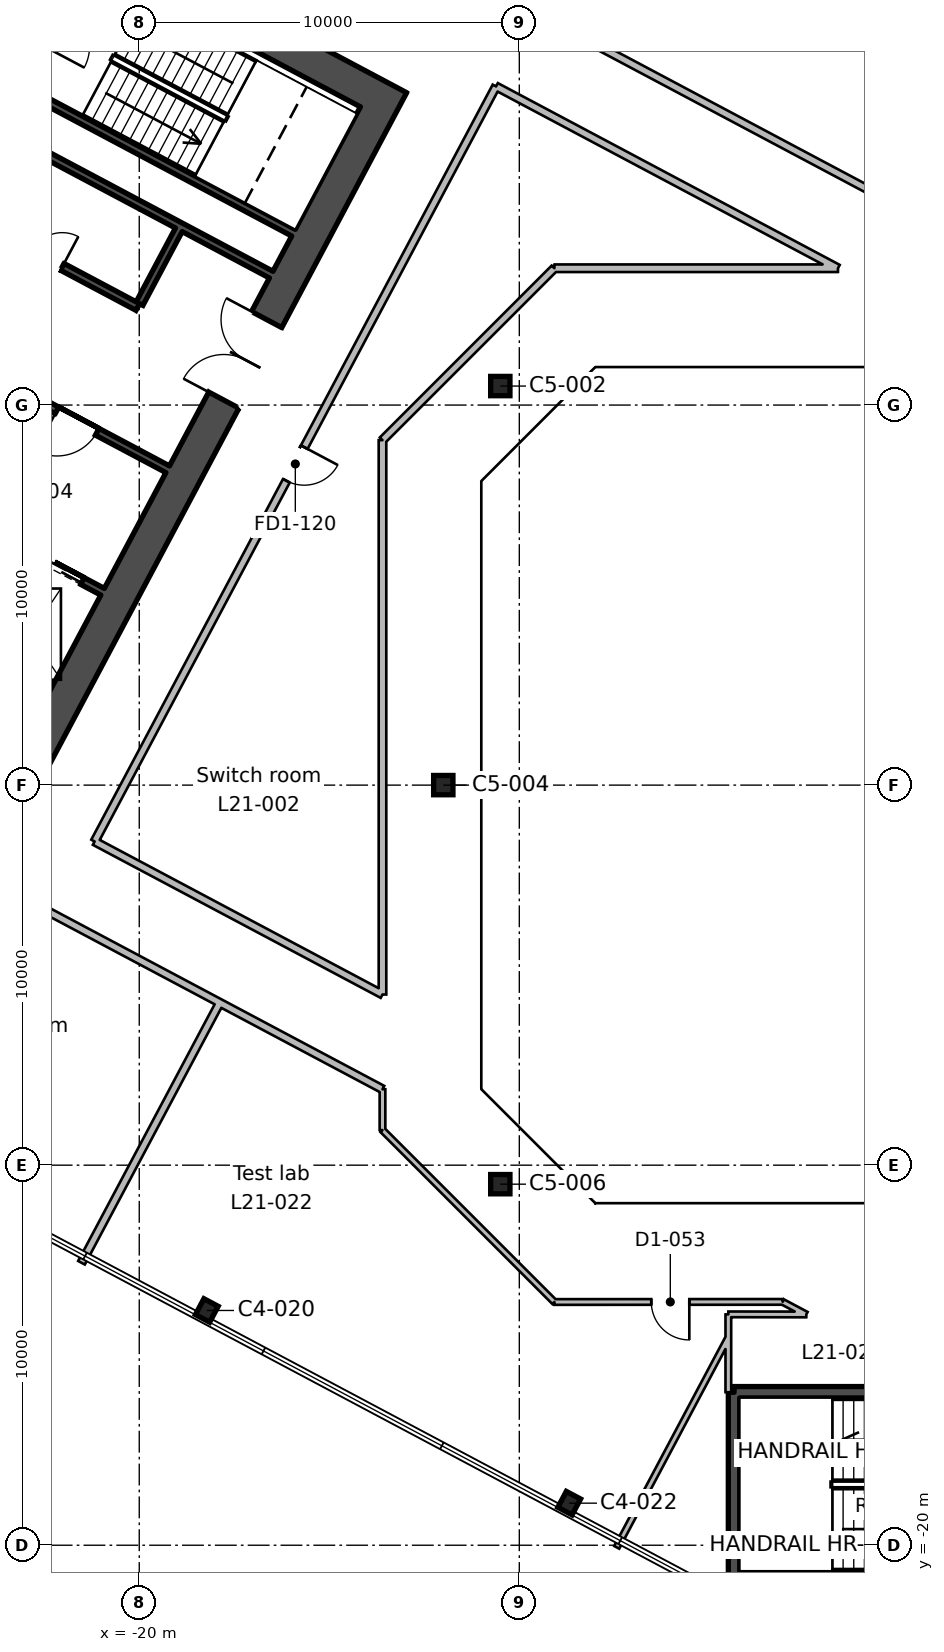
"""IFC4 building model, lengths in metres.
Left out: names, types, materials, properties, quantities, classifications, styles, units other than length and angle.
Written with IfcOpenShell. Run it as: python <this file> out.ifc"""

import sys

from ifc_helpers import new_model, si_unit, direction, frame, frame_2d, origin, origin_2d, place, context, subcontext, project, spatial, rectangle, hollow_rectangle, i_section, extrude, element, fill, save


model = new_model("IFC4")
c1 = context("Model", 3, precision=1e-05, world=origin(), true_north=direction((0.0, 1.0)))
c2 = subcontext(c1, "Body", "Model", "MODEL_VIEW")
j1 = project(units=[si_unit("LENGTHUNIT", "METRE"), si_unit("PLANEANGLEUNIT", "RADIAN")], contexts=[c1])
p1 = place(None, origin())
s1 = spatial("IfcSite", under=j1, at=p1, CompositionType="ELEMENT")
p2 = place(p1, origin())
s2 = spatial("IfcBuilding", under=s1, at=p2, CompositionType="ELEMENT")
p3 = place(p2, frame((0.0, 0.0, 107.6)))
s3 = spatial("IfcBuildingStorey", under=s2, at=p3, CompositionType="ELEMENT", Elevation=107.6)
for number, where, z_axis, x_axis in (
    (1, (-8.687, -18.893, 0.0), (0.0, 0.0, 1.0), (0.883, -0.469, 0.0)),
    (2, (-18.223, -13.823, 0.0), (0.0, 0.0, 1.0), (0.883, -0.469, 0.0)),
):
    element("IfcColumn", number, at=place(p3, frame(where, z_axis=z_axis, x_axis=x_axis)), inside=s3, PredefinedType="COLUMN", context=c2, shape_type="SweptSolid", body=[
        extrude(i_section(OverallWidth=0.424, OverallDepth=0.475, WebThickness=0.048, FlangeThickness=0.077, FilletRadius=0.015, at=origin_2d()), origin(), (0.0, 0.0, 1.0), 4.6),
    ])
for number, where, z_axis, x_axis in (
    (3, (-10.5, -10.5, 0.0), (0.0, 0.0, 1.0), (1.0, 0.0, 0.0)),
    (4, (-12.0, 0.0, 0.0), (0.0, 0.0, 1.0), (1.0, 0.0, 0.0)),
    (5, (-10.5, 10.5, 0.0), (0.0, 0.0, 1.0), (1.0, 0.0, 0.0)),
):
    element("IfcColumn", number, at=place(p3, frame(where, z_axis=z_axis, x_axis=x_axis)), inside=s3, PredefinedType="COLUMN", context=c2, shape_type="SweptSolid", body=[
        extrude(hollow_rectangle(XDim=0.508, YDim=0.508, WallThickness=0.021, InnerFilletRadius=0.01, OuterFilletRadius=0.031, at=origin_2d()), origin(), (0.0, 0.0, 1.0), 4.6),
    ])
p4 = place(p3, frame((-13.362, 18.43, 0.0), z_axis=(0.0, 0.0, 1.0), x_axis=(-0.46947084998, -0.882947971864, 0.0)))
e6 = element("IfcWall", 6, at=p4, inside=s3, PredefinedType="SHEAR", context=c2, shape_type="SweptSolid", body=[
    extrude(rectangle(XDim=20.0, YDim=0.9, at=frame_2d((10.0, 0.0))), origin(), (0.0, 0.0, 1.0), 4.6),
])
p5 = place(p4, frame((7.0, 0.0, 0.0)))
e7 = element("IfcOpeningElement", 7, at=p5, cuts=e6, PredefinedType="OPENING", context=c2, shape_type="SweptSolid", body=[
    extrude(rectangle(XDim=2.4, YDim=2.4, at=frame_2d((1.2, 1.2))), frame((0.0, 0.46, 0.0), z_axis=(0.0, -1.0, 0.0), x_axis=(1.0, 0.0, 0.0)), (0.0, 0.0, 1.0), 0.92),
])
p6 = place(p3, frame((-13.97, 18.244, 0.0), z_axis=(0.0, 0.0, 1.0), x_axis=(-0.88294509198, 0.469476266226, 0.0)))
e8 = element("IfcWall", 8, at=p6, inside=s3, PredefinedType="SHEAR", context=c2, shape_type="SweptSolid", body=[
    extrude(rectangle(XDim=20.2, YDim=0.9, at=frame_2d((10.1, 0.0))), origin(), (0.0, 0.0, 1.0), 4.6),
])
p7 = place(p3, frame((-18.96, 14.611, 0.0), z_axis=(0.0, 0.0, 1.0), x_axis=(-0.4694473164, -0.882960484464, 0.0)))
e9 = element("IfcWall", 9, at=p7, inside=s3, PredefinedType="SHEAR", context=c2, shape_type="SweptSolid", body=[
    extrude(rectangle(XDim=2.2, YDim=0.2, at=frame_2d((1.1, 0.0))), origin(), (0.0, 0.0, 1.0), 4.6),
])
p8 = place(p3, frame((-21.333, 21.649, 0.0), z_axis=(0.0, 0.0, 1.0), x_axis=(-0.469494272526, -0.882935517501, 0.0)))
e10 = element("IfcWall", 10, at=p8, inside=s3, PredefinedType="SHEAR", context=c2, shape_type="SweptSolid", body=[
    extrude(rectangle(XDim=7.3, YDim=0.2, at=frame_2d((3.65, 0.0))), origin(), (0.0, 0.0, 1.0), 4.6),
])
p9 = place(p8, frame((1.3, 0.0, 0.0)))
e11 = element("IfcOpeningElement", 11, at=p9, cuts=e10, PredefinedType="OPENING", context=c2, shape_type="SweptSolid", body=[
    extrude(rectangle(XDim=1.2, YDim=2.1, at=frame_2d((0.6, 1.05))), frame((0.0, 0.11, 0.0), z_axis=(0.0, -1.0, 0.0), x_axis=(1.0, 0.0, 0.0)), (0.0, 0.0, 1.0), 0.22),
])
p10 = place(p3, frame((-15.942, 14.536, 0.0), z_axis=(0.0, 0.0, 1.0), x_axis=(-0.882946947542, 0.469472776449, 0.0)))
e12 = element("IfcWall", 12, at=p10, inside=s3, PredefinedType="SHEAR", context=c2, shape_type="SweptSolid", body=[
    extrude(rectangle(XDim=8.0, YDim=0.2, at=frame_2d((4.0, 0.0))), origin(), (0.0, 0.0, 1.0), 4.6),
])
p11 = place(p3, frame((-16.529, 13.432, 0.0), z_axis=(0.0, 0.0, 1.0), x_axis=(-0.88295287151, 0.469461634952, 0.0)))
e13 = element("IfcWall", 13, at=p11, inside=s3, PredefinedType="SHEAR", context=c2, shape_type="SweptSolid", body=[
    extrude(rectangle(XDim=8.0, YDim=0.2, at=frame_2d((4.0, 0.0))), origin(), (0.0, 0.0, 1.0), 4.6),
])
p12 = place(p3, frame((-20.04, 12.581, 0.0), z_axis=(0.0, 0.0, 1.0), x_axis=(-0.882942972946, 0.469480251476, 0.0)))
e14 = element("IfcWall", 14, at=p12, inside=s3, PredefinedType="SHEAR", context=c2, shape_type="SweptSolid", body=[
    extrude(rectangle(XDim=5.4, YDim=0.2, at=frame_2d((2.7, 0.0))), origin(), (0.0, 0.0, 1.0), 4.6),
])
p13 = place(p12, frame((2.25, 0.0, 0.0)))
e15 = element("IfcOpeningElement", 15, at=p13, cuts=e14, PredefinedType="OPENING", context=c2, shape_type="SweptSolid", body=[
    extrude(rectangle(XDim=0.9, YDim=2.1, at=frame_2d((0.45, 1.05))), frame((0.0, 0.11, 0.0), z_axis=(0.0, -1.0, 0.0), x_axis=(1.0, 0.0, 0.0)), (0.0, 0.0, 1.0), 0.22),
])
p14 = place(p3, frame((-19.252, 8.311, 0.0), z_axis=(0.0, 0.0, 1.0), x_axis=(-0.882955722218, 0.469456273365, 0.0)))
e16 = element("IfcWall", 16, at=p14, inside=s3, PredefinedType="SHEAR", context=c2, shape_type="SweptSolid", body=[
    extrude(rectangle(XDim=10.0, YDim=0.2, at=frame_2d((5.0, 0.0))), origin(), (0.0, 0.0, 1.0), 4.6),
])
p15 = place(p14, frame((2.1, 0.0, 0.0)))
e17 = element("IfcOpeningElement", 17, at=p15, cuts=e16, PredefinedType="OPENING", context=c2, shape_type="SweptSolid", body=[
    extrude(rectangle(XDim=1.2, YDim=2.1, at=frame_2d((0.6, 1.05))), frame((0.0, 0.11, 0.0), z_axis=(0.0, -1.0, 0.0), x_axis=(1.0, 0.0, 0.0)), (0.0, 0.0, 1.0), 0.22),
])
p16 = place(p3, frame((-20.965, 5.088, 0.0), z_axis=(0.0, 0.0, 1.0), x_axis=(-0.882925986334, 0.469512196493, 0.0)))
e18 = element("IfcWall", 18, at=p16, inside=s3, PredefinedType="SHEAR", context=c2, shape_type="SweptSolid", body=[
    extrude(rectangle(XDim=4.5, YDim=0.2, at=frame_2d((2.25, 0.0))), origin(), (0.0, 0.0, 1.0), 4.6),
])
p17 = place(p16, frame((0.6, 0.0, 0.0)))
e19 = element("IfcOpeningElement", 19, at=p17, cuts=e18, PredefinedType="OPENING", context=c2, shape_type="SweptSolid", body=[
    extrude(rectangle(XDim=1.1, YDim=2.1, at=frame_2d((0.55, 1.05))), frame((0.0, 0.11, 0.0), z_axis=(0.0, -1.0, 0.0), x_axis=(1.0, 0.0, 0.0)), (0.0, 0.0, 1.0), 0.22),
])
p18 = place(p3, frame((3.95, -20.825, 0.0), z_axis=(0.0, 0.0, 1.0), x_axis=(-1.0, 0.0, 0.0)))
e20 = element("IfcWall", 20, at=p18, inside=s3, PredefinedType="SHEAR", context=c2, shape_type="SweptSolid", body=[
    extrude(rectangle(XDim=8.3, YDim=0.3, at=frame_2d((4.15, 0.0))), origin(), (0.0, 0.0, 1.0), 4.6),
])
p19 = place(p3, frame((-4.35, -20.825, 0.0), z_axis=(0.0, 0.0, 1.0), x_axis=(0.0, 1.0, 0.0)))
e21 = element("IfcWall", 21, at=p19, inside=s3, PredefinedType="SHEAR", context=c2, shape_type="SweptSolid", body=[
    extrude(rectangle(XDim=4.85, YDim=0.3, at=frame_2d((2.425, 0.0))), origin(), (0.0, 0.0, 1.0), 4.6),
])
p20 = place(p3, frame((-4.35, -15.975, 0.0), z_axis=(0.0, 0.0, 1.0), x_axis=(1.0, 0.0, 0.0)))
e22 = element("IfcWall", 22, at=p20, inside=s3, PredefinedType="SHEAR", context=c2, shape_type="SweptSolid", body=[
    extrude(rectangle(XDim=8.3, YDim=0.3, at=frame_2d((4.15, 0.0))), origin(), (0.0, 0.0, 1.0), 4.6),
])
p21 = place(p20, frame((6.05, 0.0, 0.0)))
e23 = element("IfcOpeningElement", 23, at=p21, cuts=e22, PredefinedType="OPENING", context=c2, shape_type="SweptSolid", body=[
    extrude(rectangle(XDim=1.9, YDim=2.1, at=frame_2d((0.95, 1.05))), frame((0.0, 0.16, 0.0), z_axis=(0.0, -1.0, 0.0), x_axis=(1.0, 0.0, 0.0)), (0.0, 0.0, 1.0), 0.32),
])
p22 = place(p3, frame((-13.6, -9.077, 0.0), z_axis=(0.0, 0.0, 1.0), x_axis=(0.0, 1.0, 0.0)))
e24 = element("IfcWall", 24, at=p22, inside=s3, PredefinedType="PARTITIONING", context=c2, shape_type="SweptSolid", body=[
    extrude(rectangle(XDim=1.075, YDim=0.15, at=frame_2d((0.538, 0.0))), origin(), (0.0, 0.0, 1.0), 4.15),
])
p23 = place(p3, frame((-13.6, -8.002, 0.0), z_axis=(0.0, 0.0, 1.0), x_axis=(-0.882949686262, 0.469467625646, 0.0)))
e25 = element("IfcWall", 25, at=p23, inside=s3, PredefinedType="PARTITIONING", context=c2, shape_type="SweptSolid", body=[
    extrude(rectangle(XDim=34.795, YDim=0.2, at=frame_2d((17.397, 0.0))), origin(), (0.0, 0.0, 1.0), 4.15),
])
p24 = place(p23, frame((26.25, 0.0, 0.0)))
e26 = element("IfcOpeningElement", 26, at=p24, cuts=e25, PredefinedType="OPENING", context=c2, shape_type="SweptSolid", body=[
    extrude(rectangle(XDim=1.0, YDim=2.1, at=frame_2d((0.5, 1.05))), frame((0.0, 0.11, 0.0), z_axis=(0.0, -1.0, 0.0), x_axis=(1.0, 0.0, 0.0)), (0.0, 0.0, 1.0), 0.22),
])
p25 = place(p23, frame((16.85, 0.0, 0.0)))
e27 = element("IfcOpeningElement", 27, at=p25, cuts=e25, PredefinedType="OPENING", context=c2, shape_type="SweptSolid", body=[
    extrude(rectangle(XDim=1.0, YDim=2.1, at=frame_2d((0.5, 1.05))), frame((0.0, 0.11, 0.0), z_axis=(0.0, -1.0, 0.0), x_axis=(1.0, 0.0, 0.0)), (0.0, 0.0, 1.0), 0.22),
])
p26 = place(p3, frame((-17.881, -5.725, 0.0), z_axis=(0.0, 0.0, 1.0), x_axis=(-0.469513711464, -0.882925180719, 0.0)))
e28 = element("IfcWall", 28, at=p26, inside=s3, PredefinedType="PARTITIONING", context=c2, shape_type="SweptSolid", body=[
    extrude(rectangle(XDim=7.75, YDim=0.2, at=frame_2d((3.875, 0.0))), origin(), (0.0, 0.0, 1.0), 4.15),
])
p27 = place(p3, frame((-32.541, 32.535, 0.0), z_axis=(0.0, 0.0, 1.0), x_axis=(0.882951675281, -0.469463884787, 0.0)))
e29 = element("IfcWall", 29, at=p27, inside=s3, PredefinedType="PARTITIONING", context=c2, shape_type="SweptSolid", body=[
    extrude(rectangle(XDim=36.855, YDim=0.2, at=frame_2d((18.427, 0.0))), origin(), (0.0, 0.0, 1.0), 4.15),
])
p28 = place(p27, frame((17.95, 0.0, 0.0)))
e30 = element("IfcOpeningElement", 30, at=p28, cuts=e29, PredefinedType="OPENING", context=c2, shape_type="SweptSolid", body=[
    extrude(rectangle(XDim=1.0, YDim=2.1, at=frame_2d((0.5, 1.05))), frame((0.0, 0.11, 0.0), z_axis=(0.0, -1.0, 0.0), x_axis=(1.0, 0.0, 0.0)), (0.0, 0.0, 1.0), 0.22),
])
p29 = place(p27, frame((14.75, 0.0, 0.0)))
e31 = element("IfcOpeningElement", 31, at=p29, cuts=e29, PredefinedType="OPENING", context=c2, shape_type="SweptSolid", body=[
    extrude(rectangle(XDim=1.0, YDim=2.1, at=frame_2d((0.5, 1.05))), frame((0.0, 0.11, 0.0), z_axis=(0.0, -1.0, 0.0), x_axis=(1.0, 0.0, 0.0)), (0.0, 0.0, 1.0), 0.22),
])
p30 = place(p3, frame((-13.6, -9.077, 0.0), z_axis=(0.0, 0.0, 1.0), x_axis=(0.707106781187, -0.707106781187, 0.0)))
e32 = element("IfcWall", 32, at=p30, inside=s3, PredefinedType="PARTITIONING", context=c2, shape_type="SweptSolid", body=[
    extrude(rectangle(XDim=6.397, YDim=0.15, at=frame_2d((3.198, 0.0))), origin(), (0.0, 0.0, 1.0), 4.15),
])
p31 = place(p3, frame((-9.077, -13.6, 0.0), z_axis=(0.0, 0.0, 1.0), x_axis=(0.999999860368, 0.000528455211, 0.0)))
e33 = element("IfcWall", 33, at=p31, inside=s3, PredefinedType="PARTITIONING", context=c2, shape_type="SweptSolid", body=[
    extrude(rectangle(XDim=6.006, YDim=0.15, at=frame_2d((3.003, 0.0))), origin(), (0.0, 0.0, 1.0), 4.15),
])
p32 = place(p31, frame((2.55, 0.0, 0.0)))
e34 = element("IfcOpeningElement", 34, at=p32, cuts=e33, PredefinedType="OPENING", context=c2, shape_type="SweptSolid", body=[
    extrude(rectangle(XDim=1.0, YDim=2.1, at=frame_2d((0.5, 1.05))), frame((0.0, 0.085, 0.0), z_axis=(0.0, -1.0, 0.0), x_axis=(1.0, 0.0, 0.0)), (0.0, 0.0, 1.0), 0.17),
])
p33 = place(p3, frame((-3.071, -13.597, 0.0), z_axis=(0.0, 0.0, 1.0), x_axis=(0.883079874776, -0.469222692083, 0.0)))
e35 = element("IfcWall", 35, at=p33, inside=s3, PredefinedType="PARTITIONING", context=c2, shape_type="SweptSolid", body=[
    extrude(rectangle(XDim=0.706, YDim=0.15, at=frame_2d((0.353, 0.0))), origin(), (0.0, 0.0, 1.0), 4.15),
])
p34 = place(p3, frame((-2.448, -13.928, 0.0), z_axis=(0.0, 0.0, 1.0), x_axis=(-0.999998980807, 0.001427720139, 0.0)))
e36 = element("IfcWall", 36, at=p34, inside=s3, PredefinedType="PARTITIONING", context=c2, shape_type="SweptSolid", body=[
    extrude(rectangle(XDim=2.052, YDim=0.15, at=frame_2d((1.026, 0.0))), origin(), (0.0, 0.0, 1.0), 4.15),
])
p35 = place(p3, frame((-4.5, -13.925, 0.0), z_axis=(0.0, 0.0, 1.0), x_axis=(0.0, -1.0, 0.0)))
e37 = element("IfcWall", 37, at=p35, inside=s3, PredefinedType="PARTITIONING", context=c2, shape_type="SweptSolid", body=[
    extrude(rectangle(XDim=2.05, YDim=0.15, at=frame_2d((1.025, 0.0))), origin(), (0.0, 0.0, 1.0), 4.15),
])
p36 = place(p3, frame((-4.5, -14.533, 0.0), z_axis=(0.0, 0.0, 1.0), x_axis=(-0.469522352041, -0.882920585859, 0.0)))
e38 = element("IfcWall", 38, at=p36, inside=s3, PredefinedType="PARTITIONING", context=c2, shape_type="SweptSolid", body=[
    extrude(rectangle(XDim=6.255, YDim=0.15, at=frame_2d((3.128, 0.0))), origin(), (0.0, 0.0, 1.0), 4.15),
])
p37 = place(p3, frame((-21.175, -1.483, 0.0), z_axis=(0.0, 0.0, 1.0), x_axis=(0.469455871296, 0.882955935993, 0.0)))
e39 = element("IfcWall", 39, at=p37, inside=s3, PredefinedType="PARTITIONING", context=c2, shape_type="SweptSolid", body=[
    extrude(rectangle(XDim=22.5, YDim=0.2, at=frame_2d((11.25, 0.0))), origin(), (0.0, 0.0, 1.0), 4.15),
])
p38 = place(p37, frame((10.75, 0.0, 0.0)))
e40 = element("IfcOpeningElement", 40, at=p38, cuts=e39, PredefinedType="OPENING", context=c2, shape_type="SweptSolid", body=[
    extrude(rectangle(XDim=1.0, YDim=2.1, at=frame_2d((0.5, 1.05))), frame((0.0, 0.11, 0.0), z_axis=(0.0, -1.0, 0.0), x_axis=(1.0, 0.0, 0.0)), (0.0, 0.0, 1.0), 0.22),
])
p39 = place(p3, frame((-10.612, 18.384, 0.0), z_axis=(0.0, 0.0, 1.0), x_axis=(0.882943182981, -0.469479856467, 0.0)))
e41 = element("IfcWall", 41, at=p39, inside=s3, PredefinedType="PARTITIONING", context=c2, shape_type="SweptSolid", body=[
    extrude(rectangle(XDim=10.19, YDim=0.2, at=frame_2d((5.095, 0.0))), origin(), (0.0, 0.0, 1.0), 4.15),
])
p40 = place(p3, frame((-1.615, 13.6, 0.0), z_axis=(0.0, 0.0, 1.0), x_axis=(-1.0, 0.0, 0.0)))
e42 = element("IfcWall", 42, at=p40, inside=s3, PredefinedType="PARTITIONING", context=c2, shape_type="SweptSolid", body=[
    extrude(rectangle(XDim=7.462, YDim=0.2, at=frame_2d((3.731, 0.0))), origin(), (0.0, 0.0, 1.0), 4.15),
])
p41 = place(p3, frame((-9.077, 13.6, 0.0), z_axis=(0.0, 0.0, 1.0), x_axis=(-0.707106781187, -0.707106781187, 0.0)))
e43 = element("IfcWall", 43, at=p41, inside=s3, PredefinedType="PARTITIONING", context=c2, shape_type="SweptSolid", body=[
    extrude(rectangle(XDim=6.397, YDim=0.2, at=frame_2d((3.198, 0.0))), origin(), (0.0, 0.0, 1.0), 4.15),
])
p42 = place(p3, frame((-13.6, 9.077, 0.0), z_axis=(0.0, 0.0, 1.0), x_axis=(0.0, -1.0, 0.0)))
e44 = element("IfcWall", 44, at=p42, inside=s3, PredefinedType="PARTITIONING", context=c2, shape_type="SweptSolid", body=[
    extrude(rectangle(XDim=14.587, YDim=0.2, at=frame_2d((7.293, 0.0))), origin(), (0.0, 0.0, 1.0), 4.15),
])
p43 = place(p3, frame((-13.6, -5.51, 0.0), z_axis=(0.0, 0.0, 1.0), x_axis=(-0.882975295816, 0.469419457392, 0.0)))
e45 = element("IfcWall", 45, at=p43, inside=s3, PredefinedType="PARTITIONING", context=c2, shape_type="SweptSolid", body=[
    extrude(rectangle(XDim=8.579, YDim=0.2, at=frame_2d((4.29, 0.0))), origin(), (0.0, 0.0, 1.0), 4.15),
])
p44 = place(p5, frame((2.4, 0.0, 0.0), z_axis=(0.0, 0.0, 1.0), x_axis=(-1.0, 0.0, 0.0)))
e46 = element("IfcDoor", 46, at=p44, inside=s3, OperationType="DOUBLE_DOOR_SINGLE_SWING", PredefinedType="DOOR", context=c2, shape_type="SweptSolid", body=[
    extrude(rectangle(XDim=2.4, YDim=2.4, at=frame_2d((1.2, 1.2))), frame((0.0, 0.025, 0.0), z_axis=(0.0, -1.0, 0.0), x_axis=(1.0, 0.0, 0.0)), (0.0, 0.0, 1.0), 0.05),
])
fill(e7, e46)
p45 = place(p15, origin())
e47 = element("IfcDoor", 47, at=p45, inside=s3, OperationType="SINGLE_SWING_RIGHT", PredefinedType="DOOR", context=c2, shape_type="SweptSolid", body=[
    extrude(rectangle(XDim=1.2, YDim=2.1, at=frame_2d((0.6, 1.05))), frame((0.0, 0.025, 0.0), z_axis=(0.0, -1.0, 0.0), x_axis=(1.0, 0.0, 0.0)), (0.0, 0.0, 1.0), 0.05),
])
fill(e17, e47)
p46 = place(p13, frame((0.9, 0.0, 0.0), z_axis=(0.0, 0.0, 1.0), x_axis=(-1.0, 0.0, 0.0)))
e48 = element("IfcDoor", 48, at=p46, inside=s3, OperationType="SINGLE_SWING_RIGHT", PredefinedType="DOOR", context=c2, shape_type="SweptSolid", body=[
    extrude(rectangle(XDim=0.9, YDim=2.1, at=frame_2d((0.45, 1.05))), frame((0.0, 0.025, 0.0), z_axis=(0.0, -1.0, 0.0), x_axis=(1.0, 0.0, 0.0)), (0.0, 0.0, 1.0), 0.05),
])
fill(e15, e48)
p47 = place(p17, origin())
e49 = element("IfcDoor", 49, at=p47, inside=s3, OperationType="DOUBLE_DOOR_SLIDING", PredefinedType="DOOR", context=c2, shape_type="SweptSolid", body=[
    extrude(rectangle(XDim=1.1, YDim=2.1, at=frame_2d((0.55, 1.05))), frame((0.0, 0.025, 0.0), z_axis=(0.0, -1.0, 0.0), x_axis=(1.0, 0.0, 0.0)), (0.0, 0.0, 1.0), 0.05),
])
fill(e19, e49)
p48 = place(p38, frame((1.0, 0.0, 0.0), z_axis=(0.0, 0.0, 1.0), x_axis=(-1.0, 0.0, 0.0)))
e50 = element("IfcDoor", 50, at=p48, inside=s3, OperationType="SINGLE_SWING_LEFT", PredefinedType="DOOR", context=c2, shape_type="SweptSolid", body=[
    extrude(rectangle(XDim=1.0, YDim=2.1, at=frame_2d((0.5, 1.05))), frame((0.0, 0.025, 0.0), z_axis=(0.0, -1.0, 0.0), x_axis=(1.0, 0.0, 0.0)), (0.0, 0.0, 1.0), 0.05),
])
fill(e40, e50)
p49 = place(p32, frame((1.0, 0.0, 0.0), z_axis=(0.0, 0.0, 1.0), x_axis=(-1.0, 0.0, 0.0)))
e51 = element("IfcDoor", 51, at=p49, inside=s3, OperationType="SINGLE_SWING_LEFT", PredefinedType="DOOR", context=c2, shape_type="SweptSolid", body=[
    extrude(rectangle(XDim=1.0, YDim=2.1, at=frame_2d((0.5, 1.05))), frame((0.0, 0.025, 0.0), z_axis=(0.0, -1.0, 0.0), x_axis=(1.0, 0.0, 0.0)), (0.0, 0.0, 1.0), 0.05),
])
fill(e34, e51)
save(model, sys.argv[1])
